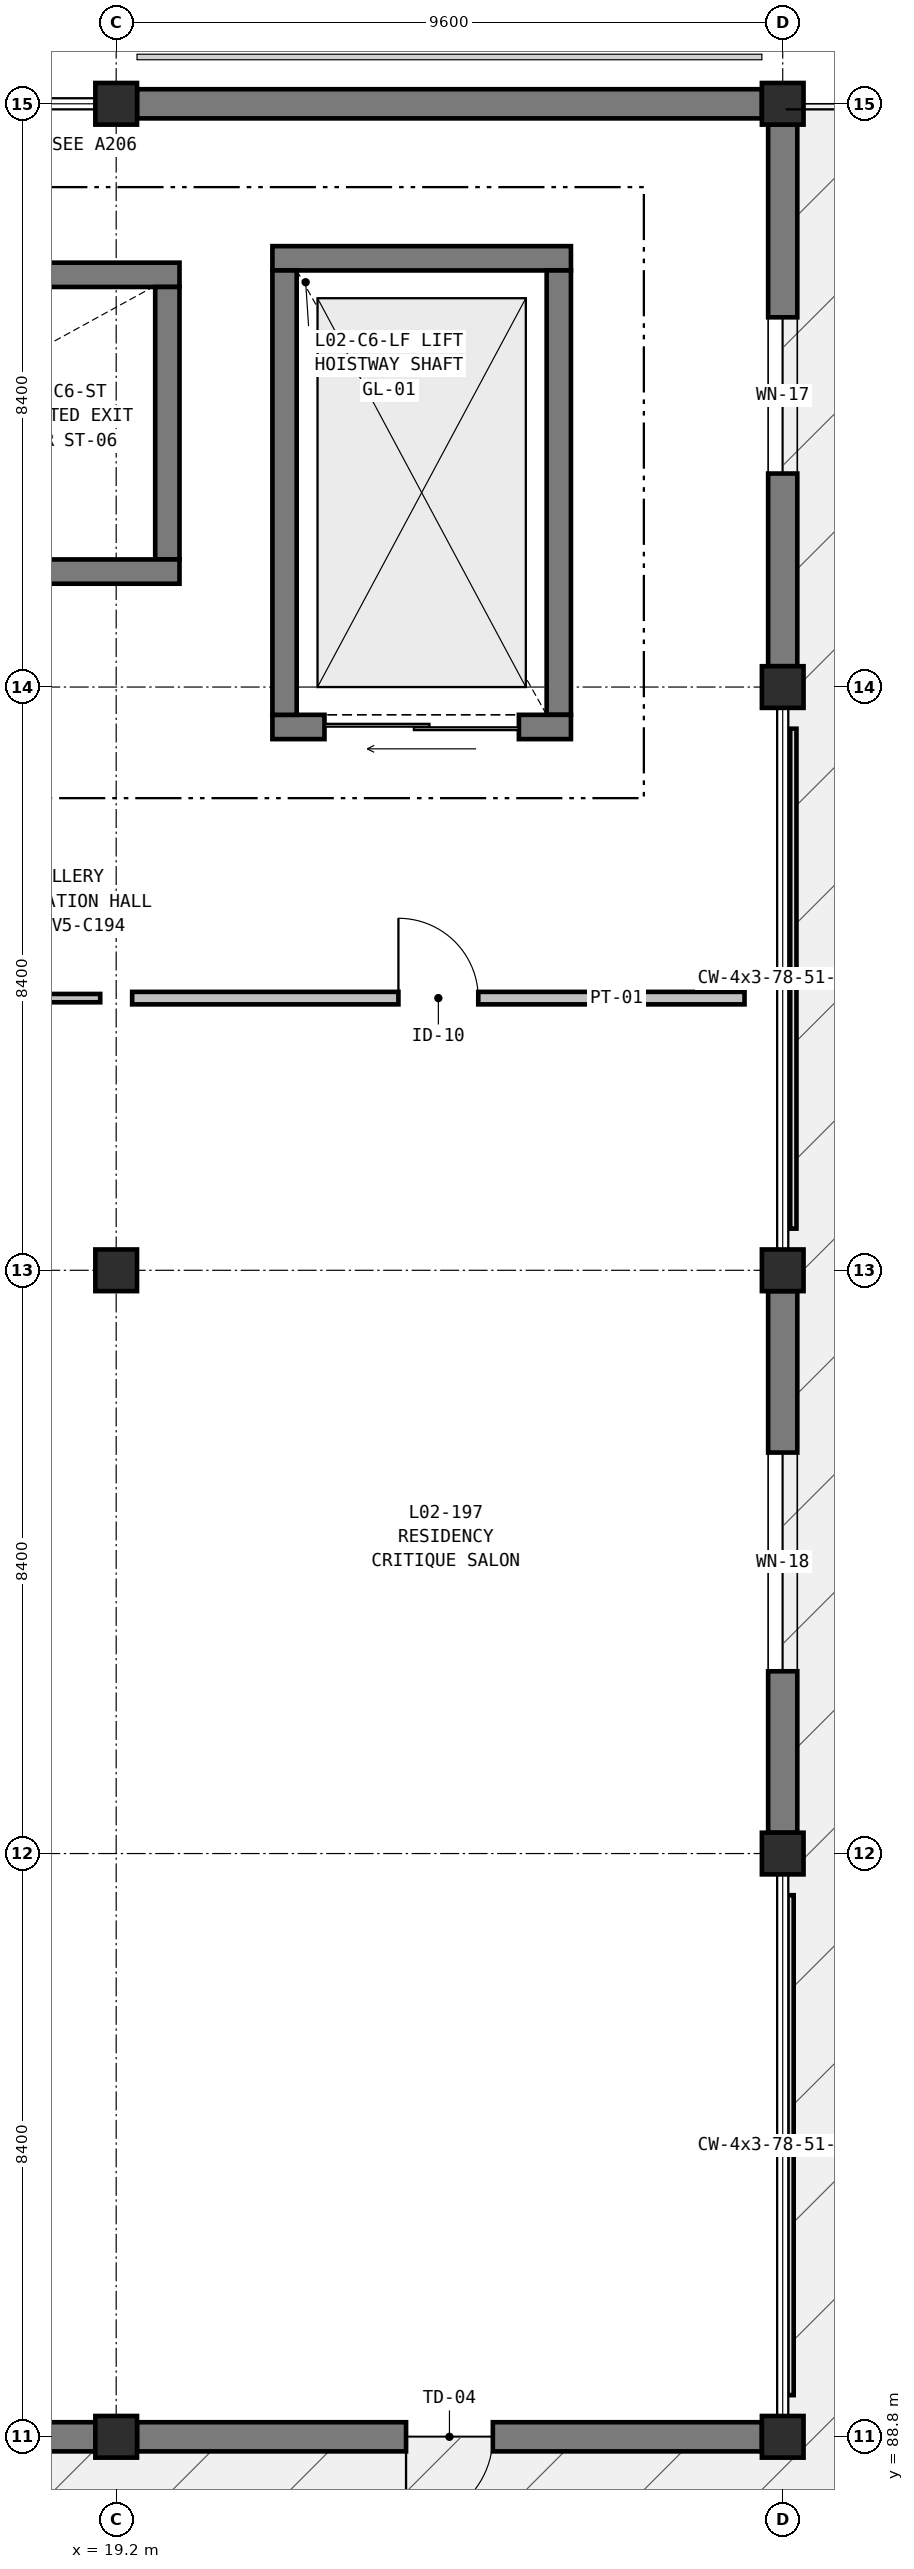
"""IFC4 building model, lengths in metres.
Left out: names, types, materials, properties, quantities, classifications, styles, units other than length and angle.
Written with IfcOpenShell. Run it as: python <this file> out.ifc"""

import sys

from ifc_helpers import new_model, si_unit, direction, frame, frame_2d, origin, origin_2d, place, context, subcontext, project, spatial, rectangle, extrude, element, fill, save


model = new_model("IFC4")
c1 = context("Model", 3, precision=1e-05, world=origin(), true_north=direction((0.0, 1.0)))
c2 = subcontext(c1, "Body", "Model", "MODEL_VIEW")
j1 = project(units=[si_unit("LENGTHUNIT", "METRE"), si_unit("PLANEANGLEUNIT", "RADIAN")], contexts=[c1])
p1 = place(None, origin())
s1 = spatial("IfcSite", under=j1, at=p1, CompositionType="ELEMENT")
p2 = place(p1, origin())
s2 = spatial("IfcBuilding", under=s1, at=p2, CompositionType="ELEMENT")
p3 = place(p2, frame((0.0, 0.0, 11.4)))
s3 = spatial("IfcBuildingStorey", under=s2, at=p3, CompositionType="ELEMENT", Elevation=11.4)
for number, where, z_axis, x_axis in (
    (1, (19.2, 88.8, 0.0), (0.0, 0.0, 1.0), (1.0, 0.0, 0.0)),
    (2, (19.2, 105.6, 0.0), (0.0, 0.0, 1.0), (1.0, 0.0, 0.0)),
    (3, (19.2, 122.4, 0.0), (0.0, 0.0, 1.0), (1.0, 0.0, 0.0)),
    (4, (28.8, 88.8, 0.0), (0.0, 0.0, 1.0), (1.0, 0.0, 0.0)),
    (5, (28.8, 97.2, 0.0), (0.0, 0.0, 1.0), (1.0, 0.0, 0.0)),
    (6, (28.8, 105.6, 0.0), (0.0, 0.0, 1.0), (1.0, 0.0, 0.0)),
    (7, (28.8, 114.0, 0.0), (0.0, 0.0, 1.0), (1.0, 0.0, 0.0)),
    (8, (28.8, 122.4, 0.0), (0.0, 0.0, 1.0), (1.0, 0.0, 0.0)),
):
    element("IfcColumn", number, at=place(p3, frame(where, z_axis=z_axis, x_axis=x_axis)), inside=s3, PredefinedType="COLUMN", context=c2, shape_type="SweptSolid", body=[
        extrude(rectangle(XDim=0.6, YDim=0.6, at=origin_2d()), origin(), (0.0, 0.0, 1.0), 5.4),
    ])
p4 = place(p3, frame((19.5, 122.4, 0.0), z_axis=(0.0, 0.0, 1.0), x_axis=(1.0, 0.0, 0.0)))
e9 = element("IfcWall", 9, at=p4, inside=s3, PredefinedType="SOLIDWALL", context=c2, shape_type="SweptSolid", body=[
    extrude(rectangle(XDim=9.0, YDim=0.42, at=frame_2d((4.5, 0.0))), origin(), (0.0, 0.0, 1.0), 5.1),
])
p5 = place(p3, frame((28.8, 122.1, 0.0), z_axis=(0.0, 0.0, 1.0), x_axis=(0.0, -1.0, 0.0)))
e10 = element("IfcWall", 10, at=p5, inside=s3, PredefinedType="SOLIDWALL", context=c2, shape_type="SweptSolid", body=[
    extrude(rectangle(XDim=7.8, YDim=0.42, at=frame_2d((3.9, 0.0))), origin(), (0.0, 0.0, 1.0), 5.1),
])
p6 = place(p5, frame((2.775, 0.0, 0.9)))
e11 = element("IfcOpeningElement", 11, at=p6, cuts=e10, PredefinedType="OPENING", context=c2, shape_type="SweptSolid", body=[
    extrude(rectangle(XDim=2.25, YDim=2.5, at=frame_2d((1.125, 1.25))), frame((0.0, 0.22, 0.0), z_axis=(0.0, -1.0, 0.0), x_axis=(1.0, 0.0, 0.0)), (0.0, 0.0, 1.0), 0.44),
])
p7 = place(p3, frame((28.8, 105.3, 0.0), z_axis=(0.0, 0.0, 1.0), x_axis=(0.0, -1.0, 0.0)))
e12 = element("IfcWall", 12, at=p7, inside=s3, PredefinedType="SOLIDWALL", context=c2, shape_type="SweptSolid", body=[
    extrude(rectangle(XDim=7.8, YDim=0.42, at=frame_2d((3.9, 0.0))), origin(), (0.0, 0.0, 1.0), 5.1),
])
p8 = place(p7, frame((2.325, 0.0, 0.9)))
e13 = element("IfcOpeningElement", 13, at=p8, cuts=e12, PredefinedType="OPENING", context=c2, shape_type="SweptSolid", body=[
    extrude(rectangle(XDim=3.15, YDim=2.5, at=frame_2d((1.575, 1.25))), frame((0.0, 0.22, 0.0), z_axis=(0.0, -1.0, 0.0), x_axis=(1.0, 0.0, 0.0)), (0.0, 0.0, 1.0), 0.44),
])
p9 = place(p3, frame((28.5, 88.8, 0.0), z_axis=(0.0, 0.0, 1.0), x_axis=(-1.0, 0.0, 0.0)))
e14 = element("IfcWall", 14, at=p9, inside=s3, PredefinedType="SOLIDWALL", context=c2, shape_type="SweptSolid", body=[
    extrude(rectangle(XDim=9.0, YDim=0.42, at=frame_2d((4.5, 0.0))), origin(), (0.0, 0.0, 1.0), 5.1),
])
p10 = place(p9, frame((3.875, 0.0, 0.0)))
e15 = element("IfcOpeningElement", 15, at=p10, cuts=e14, PredefinedType="OPENING", context=c2, shape_type="SweptSolid", body=[
    extrude(rectangle(XDim=1.25, YDim=2.25, at=frame_2d((0.625, 1.125))), frame((0.0, 0.22, 0.0), z_axis=(0.0, -1.0, 0.0), x_axis=(1.0, 0.0, 0.0)), (0.0, 0.0, 1.0), 0.44),
])
p11 = place(p3, frame((18.9, 88.8, 0.0), z_axis=(0.0, 0.0, 1.0), x_axis=(-1.0, 0.0, 0.0)))
e16 = element("IfcWall", 16, at=p11, inside=s3, PredefinedType="SOLIDWALL", context=c2, shape_type="SweptSolid", body=[
    extrude(rectangle(XDim=9.0, YDim=0.42, at=frame_2d((4.5, 0.0))), origin(), (0.0, 0.0, 1.0), 5.1),
])
p12 = place(p11, frame((3.675, 0.0, 0.0)))
e17 = element("IfcOpeningElement", 17, at=p12, cuts=e16, PredefinedType="OPENING", context=c2, shape_type="SweptSolid", body=[
    extrude(rectangle(XDim=1.65, YDim=2.35, at=frame_2d((0.825, 1.175))), frame((0.0, 0.22, 0.0), z_axis=(0.0, -1.0, 0.0), x_axis=(1.0, 0.0, 0.0)), (0.0, 0.0, 1.0), 0.44),
])
p13 = place(p3, frame((10.288, 119.937, 0.0), z_axis=(0.0, 0.0, 1.0), x_axis=(1.0, 0.0, 0.0)))
e18 = element("IfcWall", 18, at=p13, inside=s3, PredefinedType="SHEAR", context=c2, shape_type="SweptSolid", body=[
    extrude(rectangle(XDim=9.824, YDim=0.35, at=frame_2d((4.912, 0.0))), origin(), (0.0, 0.0, 1.0), 5.1),
])
p14 = place(p3, frame((19.937, 119.762, 0.0), z_axis=(0.0, 0.0, 1.0), x_axis=(0.0, -1.0, 0.0)))
e19 = element("IfcWall", 19, at=p14, inside=s3, PredefinedType="SHEAR", context=c2, shape_type="SweptSolid", body=[
    extrude(rectangle(XDim=3.924, YDim=0.35, at=frame_2d((1.962, 0.0))), origin(), (0.0, 0.0, 1.0), 5.1),
])
p15 = place(p3, frame((20.112, 115.663, 0.0), z_axis=(0.0, 0.0, 1.0), x_axis=(-1.0, 0.0, 0.0)))
e20 = element("IfcWall", 20, at=p15, inside=s3, PredefinedType="SHEAR", context=c2, shape_type="SweptSolid", body=[
    extrude(rectangle(XDim=9.824, YDim=0.35, at=frame_2d((4.912, 0.0))), origin(), (0.0, 0.0, 1.0), 5.1),
])
p16 = place(p3, frame((21.45, 120.175, 0.0), z_axis=(0.0, 0.0, 1.0), x_axis=(1.0, 0.0, 0.0)))
e21 = element("IfcWall", 21, at=p16, inside=s3, PredefinedType="SHEAR", context=c2, shape_type="SweptSolid", body=[
    extrude(rectangle(XDim=4.3, YDim=0.35, at=frame_2d((2.15, 0.0))), origin(), (0.0, 0.0, 1.0), 5.1),
])
p17 = place(p3, frame((25.575, 120.0, 0.0), z_axis=(0.0, 0.0, 1.0), x_axis=(0.0, -1.0, 0.0)))
e22 = element("IfcWall", 22, at=p17, inside=s3, PredefinedType="SHEAR", context=c2, shape_type="SweptSolid", body=[
    extrude(rectangle(XDim=6.4, YDim=0.35, at=frame_2d((3.2, 0.0))), origin(), (0.0, 0.0, 1.0), 5.1),
])
p18 = place(p3, frame((25.75, 113.425, 0.0), z_axis=(0.0, 0.0, 1.0), x_axis=(-1.0, 0.0, 0.0)))
e23 = element("IfcWall", 23, at=p18, inside=s3, PredefinedType="SHEAR", context=c2, shape_type="SweptSolid", body=[
    extrude(rectangle(XDim=4.3, YDim=0.35, at=frame_2d((2.15, 0.0))), origin(), (0.0, 0.0, 1.0), 5.1),
])
p19 = place(p18, frame((0.75, 0.0, 0.0)))
e24 = element("IfcOpeningElement", 24, at=p19, cuts=e23, PredefinedType="OPENING", context=c2, shape_type="SweptSolid", body=[
    extrude(rectangle(XDim=2.8, YDim=2.7, at=frame_2d((1.4, 1.35))), frame((0.0, 0.185, 0.0), z_axis=(0.0, -1.0, 0.0), x_axis=(1.0, 0.0, 0.0)), (0.0, 0.0, 1.0), 0.37),
])
p20 = place(p3, frame((21.625, 113.6, 0.0), z_axis=(0.0, 0.0, 1.0), x_axis=(0.0, 1.0, 0.0)))
e25 = element("IfcWall", 25, at=p20, inside=s3, PredefinedType="SHEAR", context=c2, shape_type="SweptSolid", body=[
    extrude(rectangle(XDim=6.4, YDim=0.35, at=frame_2d((3.2, 0.0))), origin(), (0.0, 0.0, 1.0), 5.1),
])
p21 = place(p3, frame((9.83, 109.52, 0.0), z_axis=(0.0, 0.0, 1.0), x_axis=(1.0, 0.0, 0.0)))
e26 = element("IfcWall", 26, at=p21, inside=s3, PredefinedType="PARTITIONING", context=c2, shape_type="SweptSolid", body=[
    extrude(rectangle(XDim=9.14, YDim=0.12, at=frame_2d((4.57, 0.0))), origin(), (0.0, 0.0, 1.0), 4.375),
])
p22 = place(p21, frame((3.82, 0.0, 0.0)))
e27 = element("IfcOpeningElement", 27, at=p22, cuts=e26, PredefinedType="OPENING", context=c2, shape_type="SweptSolid", body=[
    extrude(rectangle(XDim=1.5, YDim=2.3, at=frame_2d((0.75, 1.15))), frame((0.0, 0.07, 0.0), z_axis=(0.0, -1.0, 0.0), x_axis=(1.0, 0.0, 0.0)), (0.0, 0.0, 1.0), 0.14),
])
p23 = place(p3, frame((19.43, 109.52, 0.0), z_axis=(0.0, 0.0, 1.0), x_axis=(1.0, 0.0, 0.0)))
e28 = element("IfcWall", 28, at=p23, inside=s3, PredefinedType="PARTITIONING", context=c2, shape_type="SweptSolid", body=[
    extrude(rectangle(XDim=8.82, YDim=0.18, at=frame_2d((4.41, 0.0))), origin(), (0.0, 0.0, 1.0), 5.1),
])
p24 = place(p23, frame((3.835, 0.0, 0.0)))
e29 = element("IfcOpeningElement", 29, at=p24, cuts=e28, PredefinedType="OPENING", context=c2, shape_type="SweptSolid", body=[
    extrude(rectangle(XDim=1.15, YDim=2.2, at=frame_2d((0.575, 1.1))), frame((0.0, 0.1, 0.0), z_axis=(0.0, -1.0, 0.0), x_axis=(1.0, 0.0, 0.0)), (0.0, 0.0, 1.0), 0.2),
])
p25 = place(p6, origin())
e30 = element("IfcWindow", 30, at=p25, inside=s3, PartitioningType="SINGLE_PANEL", PredefinedType="WINDOW", context=c2, shape_type="SweptSolid", body=[
    extrude(rectangle(XDim=2.25, YDim=2.5, at=frame_2d((1.125, 1.25))), frame((0.0, 0.03, 0.0), z_axis=(0.0, -1.0, 0.0), x_axis=(1.0, 0.0, 0.0)), (0.0, 0.0, 1.0), 0.06),
])
fill(e11, e30)
p26 = place(p8, origin())
e31 = element("IfcWindow", 31, at=p26, inside=s3, PartitioningType="SINGLE_PANEL", PredefinedType="WINDOW", context=c2, shape_type="SweptSolid", body=[
    extrude(rectangle(XDim=3.15, YDim=2.5, at=frame_2d((1.575, 1.25))), frame((0.0, 0.03, 0.0), z_axis=(0.0, -1.0, 0.0), x_axis=(1.0, 0.0, 0.0)), (0.0, 0.0, 1.0), 0.06),
])
fill(e13, e31)
p27 = place(p10, origin())
e32 = element("IfcDoor", 32, at=p27, inside=s3, OperationType="SINGLE_SWING_RIGHT", PredefinedType="DOOR", context=c2, shape_type="SweptSolid", body=[
    extrude(rectangle(XDim=1.25, YDim=2.25, at=frame_2d((0.625, 1.125))), frame((0.0, 0.025, 0.0), z_axis=(0.0, -1.0, 0.0), x_axis=(1.0, 0.0, 0.0)), (0.0, 0.0, 1.0), 0.05),
])
fill(e15, e32)
p28 = place(p19, origin())
e33 = element("IfcDoor", 33, at=p28, inside=s3, OperationType="DOUBLE_DOOR_SLIDING", PredefinedType="DOOR", context=c2, shape_type="SweptSolid", body=[
    extrude(rectangle(XDim=2.8, YDim=2.7, at=frame_2d((1.4, 1.35))), frame((0.0, 0.025, 0.0), z_axis=(0.0, -1.0, 0.0), x_axis=(1.0, 0.0, 0.0)), (0.0, 0.0, 1.0), 0.05),
])
fill(e24, e33)
p29 = place(p24, origin())
e34 = element("IfcDoor", 34, at=p29, inside=s3, OperationType="SINGLE_SWING_LEFT", PredefinedType="DOOR", context=c2, shape_type="SweptSolid", body=[
    extrude(rectangle(XDim=1.15, YDim=2.2, at=frame_2d((0.575, 1.1))), frame((0.0, 0.025, 0.0), z_axis=(0.0, -1.0, 0.0), x_axis=(1.0, 0.0, 0.0)), (0.0, 0.0, 1.0), 0.05),
])
fill(e29, e34)
save(model, sys.argv[1])
